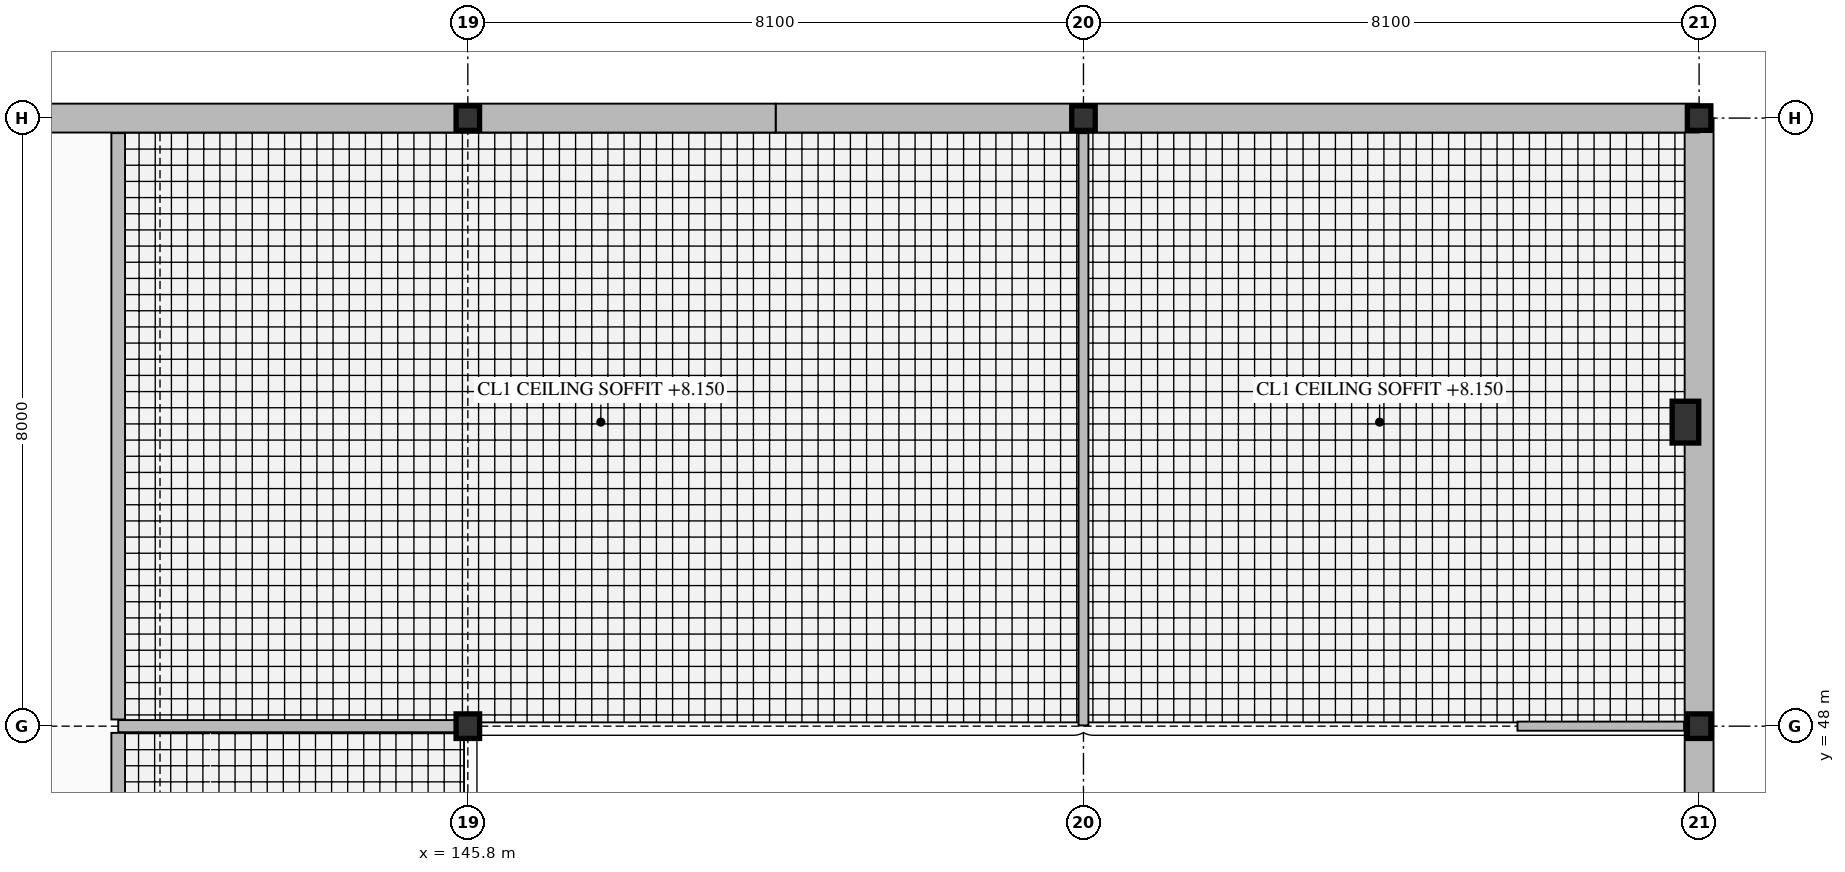
"""IFC4 building model, lengths in metres.
Left out: names, types, materials, properties, quantities, classifications, styles, units other than length and angle.
Written with IfcOpenShell. Run it as: python <this file> out.ifc"""

import sys

from ifc_helpers import new_model, si_unit, direction, frame, frame_2d, origin, origin_2d, place, context, subcontext, project, spatial, rectangle, i_section, extrude, element, fill, save


model = new_model("IFC4")
c1 = context("Model", 3, precision=1e-05, world=origin(), true_north=direction((0.0, 1.0)))
c2 = subcontext(c1, "Body", "Model", "MODEL_VIEW")
j1 = project(units=[si_unit("LENGTHUNIT", "METRE"), si_unit("PLANEANGLEUNIT", "RADIAN")], contexts=[c1])
p1 = place(None, origin())
s1 = spatial("IfcSite", under=j1, at=p1, CompositionType="ELEMENT")
p2 = place(p1, origin())
s2 = spatial("IfcBuilding", under=s1, at=p2, CompositionType="ELEMENT")
p3 = place(p2, frame((0.0, 0.0, 5.4)))
s3 = spatial("IfcBuildingStorey", under=s2, at=p3, CompositionType="ELEMENT", Elevation=5.4)
for number, where, z_axis, x_axis in (
    (1, (145.8, 48.0, 0.0), (0.0, 0.0, 1.0), (1.0, 0.0, 0.0)),
    (2, (145.8, 56.0, 0.0), (0.0, 0.0, 1.0), (1.0, 0.0, 0.0)),
    (3, (153.9, 56.0, 0.0), (0.0, 0.0, 1.0), (1.0, 0.0, 0.0)),
    (4, (162.0, 48.0, 0.0), (0.0, 0.0, 1.0), (1.0, 0.0, 0.0)),
    (5, (162.0, 56.0, 0.0), (0.0, 0.0, 1.0), (1.0, 0.0, 0.0)),
):
    element("IfcColumn", number, at=place(p3, frame(where, z_axis=z_axis, x_axis=x_axis)), inside=s3, PredefinedType="COLUMN", context=c2, shape_type="SweptSolid", body=[
        extrude(i_section(OverallWidth=0.309, OverallDepth=0.323, WebThickness=0.014, FlangeThickness=0.023, FilletRadius=0.015, at=origin_2d()), origin(), (0.0, 0.0, 1.0), 4.8),
    ])
p4 = place(p3, frame((161.82, 52.0, 0.0), z_axis=(0.0, 0.0, 1.0), x_axis=(1.0, 0.0, 0.0)))
e6 = element("IfcColumn", 6, at=p4, inside=s3, PredefinedType="PILASTER", context=c2, shape_type="SweptSolid", body=[
    extrude(rectangle(XDim=0.35, YDim=0.55, at=origin_2d()), origin(), (0.0, 0.0, 1.0), 4.52),
])
p5 = place(p3, frame((162.0, 42.0, 0.0), z_axis=(0.0, 0.0, 1.0), x_axis=(0.0, 1.0, 0.0)))
e7 = element("IfcWall", 7, at=p5, inside=s3, PredefinedType="SOLIDWALL", context=c2, shape_type="SweptSolid", body=[
    extrude(rectangle(XDim=14.0, YDim=0.38, at=frame_2d((7.0, 0.0))), origin(), (0.0, 0.0, 1.0), 3.912),
])
p6 = place(p3, frame((162.0, 56.0, 0.0), z_axis=(0.0, 0.0, 1.0), x_axis=(-1.0, 0.0, 0.0)))
e8 = element("IfcWall", 8, at=p6, inside=s3, PredefinedType="SOLIDWALL", context=c2, shape_type="SweptSolid", body=[
    extrude(rectangle(XDim=12.15, YDim=0.38, at=frame_2d((6.075, 0.0))), origin(), (0.0, 0.0, 1.0), 3.812),
])
p7 = place(p3, frame((149.85, 56.0, 0.0), z_axis=(0.0, 0.0, 1.0), x_axis=(-1.0, 0.0, 0.0)))
e9 = element("IfcWall", 9, at=p7, inside=s3, PredefinedType="SOLIDWALL", context=c2, shape_type="SweptSolid", body=[
    extrude(rectangle(XDim=12.15, YDim=0.38, at=frame_2d((6.075, 0.0))), origin(), (0.0, 0.0, 1.0), 3.812),
])
p8 = place(p3, frame((141.2, 48.0, 0.0), z_axis=(0.0, 0.0, 1.0), x_axis=(1.0, 0.0, 0.0)))
e10 = element("IfcWall", 10, at=p8, inside=s3, PredefinedType="PARTITIONING", context=c2, shape_type="SweptSolid", body=[
    extrude(rectangle(XDim=4.431, YDim=0.16, at=frame_2d((2.215, 0.0))), origin(), (0.0, 0.0, 1.0), 3.812),
])
p9 = place(p3, frame((159.61, 48.0, 0.0), z_axis=(0.0, 0.0, 1.0), x_axis=(1.0, 0.0, 0.0)))
e11 = element("IfcWall", 11, at=p9, inside=s3, PredefinedType="PARTITIONING", context=c2, shape_type="SweptSolid", body=[
    extrude(rectangle(XDim=2.192, YDim=0.12, at=frame_2d((1.096, 0.0))), origin(), (0.0, 0.0, 1.0), 3.312),
])
p10 = place(p3, frame((141.2, 32.108, 0.0), z_axis=(0.0, 0.0, 1.0), x_axis=(0.0, 1.0, 0.0)))
e12 = element("IfcWall", 12, at=p10, inside=s3, PredefinedType="PARTITIONING", context=c2, shape_type="SweptSolid", body=[
    extrude(rectangle(XDim=15.804, YDim=0.18, at=frame_2d((7.902, 0.0))), origin(), (0.0, 0.0, 1.0), 4.52),
])
p11 = place(p10, frame((7.402, 0.0, 0.0)))
e13 = element("IfcOpeningElement", 13, at=p11, cuts=e12, PredefinedType="OPENING", context=c2, shape_type="SweptSolid", body=[
    extrude(rectangle(XDim=1.0, YDim=2.2, at=frame_2d((0.5, 1.1))), frame((0.0, 0.1, 0.0), z_axis=(0.0, -1.0, 0.0), x_axis=(1.0, 0.0, 0.0)), (0.0, 0.0, 1.0), 0.2),
])
p12 = place(p3, frame((141.2, 48.088, 0.0), z_axis=(0.0, 0.0, 1.0), x_axis=(0.0, 1.0, 0.0)))
e14 = element("IfcWall", 14, at=p12, inside=s3, PredefinedType="PARTITIONING", context=c2, shape_type="SweptSolid", body=[
    extrude(rectangle(XDim=7.714, YDim=0.18, at=frame_2d((3.857, 0.0))), origin(), (0.0, 0.0, 1.0), 4.52),
])
p13 = place(p12, frame((3.357, 0.0, 0.0)))
e15 = element("IfcOpeningElement", 15, at=p13, cuts=e14, PredefinedType="OPENING", context=c2, shape_type="SweptSolid", body=[
    extrude(rectangle(XDim=1.0, YDim=2.2, at=frame_2d((0.5, 1.1))), frame((0.0, 0.1, 0.0), z_axis=(0.0, -1.0, 0.0), x_axis=(1.0, 0.0, 0.0)), (0.0, 0.0, 1.0), 0.2),
])
p14 = place(p3, frame((153.9, 48.01, 0.0), z_axis=(0.0, 0.0, 1.0), x_axis=(0.0, 1.0, 0.0)))
e16 = element("IfcWall", 16, at=p14, inside=s3, PredefinedType="PARTITIONING", context=c2, shape_type="SweptSolid", body=[
    extrude(rectangle(XDim=7.792, YDim=0.13, at=frame_2d((3.896, 0.0))), origin(), (0.0, 0.0, 1.0), 4.52),
])
p15 = place(p14, frame((3.396, 0.0, 0.0)))
e17 = element("IfcOpeningElement", 17, at=p15, cuts=e16, PredefinedType="OPENING", context=c2, shape_type="SweptSolid", body=[
    extrude(rectangle(XDim=1.0, YDim=2.2, at=frame_2d((0.5, 1.1))), frame((0.0, 0.075, 0.0), z_axis=(0.0, -1.0, 0.0), x_axis=(1.0, 0.0, 0.0)), (0.0, 0.0, 1.0), 0.15),
])
p16 = place(p13, frame((1.0, 0.0, 0.0), z_axis=(0.0, 0.0, 1.0), x_axis=(-1.0, 0.0, 0.0)))
e18 = element("IfcDoor", 18, at=p16, inside=s3, OperationType="SINGLE_SWING_RIGHT", PredefinedType="DOOR", context=c2, shape_type="SweptSolid", body=[
    extrude(rectangle(XDim=1.0, YDim=2.2, at=frame_2d((0.5, 1.1))), frame((0.0, 0.025, 0.0), z_axis=(0.0, -1.0, 0.0), x_axis=(1.0, 0.0, 0.0)), (0.0, 0.0, 1.0), 0.05),
])
fill(e15, e18)
p17 = place(p15, frame((1.0, 0.0, 0.0), z_axis=(0.0, 0.0, 1.0), x_axis=(-1.0, 0.0, 0.0)))
e19 = element("IfcDoor", 19, at=p17, inside=s3, OperationType="SINGLE_SWING_LEFT", PredefinedType="DOOR", context=c2, shape_type="SweptSolid", body=[
    extrude(rectangle(XDim=1.0, YDim=2.2, at=frame_2d((0.5, 1.1))), frame((0.0, 0.025, 0.0), z_axis=(0.0, -1.0, 0.0), x_axis=(1.0, 0.0, 0.0)), (0.0, 0.0, 1.0), 0.05),
])
fill(e17, e19)
save(model, sys.argv[1])
